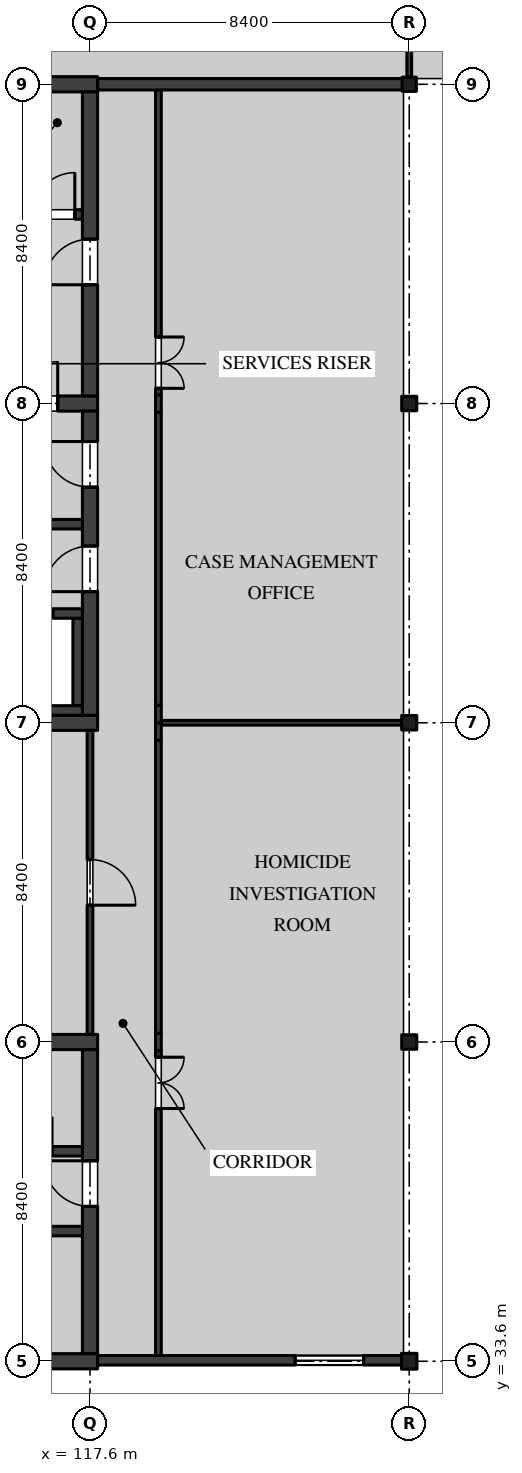
"""IFC4 building model, lengths in metres.
Left out: names, types, materials, properties, quantities, classifications, styles, units other than length and angle.
Written with IfcOpenShell. Run it as: python <this file> out.ifc"""

import sys

from ifc_helpers import new_model, si_unit, direction, frame, frame_2d, origin, origin_2d, place, context, subcontext, project, spatial, rectangle, i_section, extrude, element, fill, save


model = new_model("IFC4")
c1 = context("Model", 3, precision=1e-05, world=origin(), true_north=direction((0.0, 1.0)))
c2 = subcontext(c1, "Body", "Model", "MODEL_VIEW")
j1 = project(units=[si_unit("LENGTHUNIT", "METRE"), si_unit("PLANEANGLEUNIT", "RADIAN")], contexts=[c1])
p1 = place(None, origin())
s1 = spatial("IfcSite", under=j1, at=p1, CompositionType="ELEMENT")
p2 = place(p1, origin())
s2 = spatial("IfcBuilding", under=s1, at=p2, CompositionType="ELEMENT")
p3 = place(p2, frame((0.0, 0.0, 14.4)))
s3 = spatial("IfcBuildingStorey", under=s2, at=p3, CompositionType="ELEMENT", Elevation=14.4)
p4 = place(p3, frame((126.0, 33.6, 0.0), z_axis=(0.0, 0.0, 1.0), x_axis=(1.0, 0.0, 0.0)))
e1 = element("IfcColumn", 1, at=p4, inside=s3, PredefinedType="COLUMN", context=c2, shape_type="SweptSolid", body=[
    extrude(i_section(OverallWidth=0.406, OverallDepth=0.417, WebThickness=0.03, FlangeThickness=0.048, FilletRadius=0.015, at=origin_2d()), origin(), (0.0, 0.0, 1.0), 4.37),
])
for number, where, z_axis, x_axis in (
    (2, (126.0, 42.0, 0.0), (0.0, 0.0, 1.0), (1.0, 0.0, 0.0)),
    (3, (126.0, 50.4, 0.0), (0.0, 0.0, 1.0), (1.0, 0.0, 0.0)),
    (4, (126.0, 58.8, 0.0), (0.0, 0.0, 1.0), (1.0, 0.0, 0.0)),
):
    element("IfcColumn", number, at=place(p3, frame(where, z_axis=z_axis, x_axis=x_axis)), inside=s3, PredefinedType="COLUMN", context=c2, shape_type="SweptSolid", body=[
        extrude(i_section(OverallWidth=0.396, OverallDepth=0.381, WebThickness=0.019, FlangeThickness=0.03, FilletRadius=0.015, at=origin_2d()), origin(), (0.0, 0.0, 1.0), 4.37),
    ])
p5 = place(p3, frame((126.0, 67.2, 0.0), z_axis=(0.0, 0.0, 1.0), x_axis=(1.0, 0.0, 0.0)))
e5 = element("IfcColumn", 5, at=p5, inside=s3, PredefinedType="COLUMN", context=c2, shape_type="SweptSolid", body=[
    extrude(i_section(OverallWidth=0.373, OverallDepth=0.373, WebThickness=0.016, FlangeThickness=0.026, FilletRadius=0.015, at=origin_2d()), origin(), (0.0, 0.0, 1.0), 4.37),
])
p6 = place(p3, frame((109.0, 50.4, 0.0), z_axis=(0.0, 0.0, 1.0), x_axis=(1.0, 0.0, 0.0)))
e6 = element("IfcWall", 6, at=p6, inside=s3, PredefinedType="SHEAR", context=c2, shape_type="SweptSolid", body=[
    extrude(rectangle(XDim=8.8, YDim=0.4, at=frame_2d((4.4, 0.0))), origin(), (0.0, 0.0, 1.0), 4.37),
])
p7 = place(p3, frame((109.0, 58.8, 0.0), z_axis=(0.0, 0.0, 1.0), x_axis=(1.0, 0.0, 0.0)))
e7 = element("IfcWall", 7, at=p7, inside=s3, PredefinedType="SHEAR", context=c2, shape_type="SweptSolid", body=[
    extrude(rectangle(XDim=8.8, YDim=0.4, at=frame_2d((4.4, 0.0))), origin(), (0.0, 0.0, 1.0), 4.37),
])
p8 = place(p7, frame((6.65, 0.0, 0.0)))
e8 = element("IfcOpeningElement", 8, at=p8, cuts=e7, PredefinedType="OPENING", context=c2, shape_type="SweptSolid", body=[
    extrude(rectangle(XDim=1.1, YDim=2.1, at=frame_2d((0.55, 1.05))), frame((0.0, 0.21, 0.0), z_axis=(0.0, -1.0, 0.0), x_axis=(1.0, 0.0, 0.0)), (0.0, 0.0, 1.0), 0.42),
])
p9 = place(p3, frame((117.6, 50.6, 0.0), z_axis=(0.0, 0.0, 1.0), x_axis=(0.0, 1.0, 0.0)))
e9 = element("IfcWall", 9, at=p9, inside=s3, PredefinedType="SHEAR", context=c2, shape_type="SweptSolid", body=[
    extrude(rectangle(XDim=8.0, YDim=0.4, at=frame_2d((4.0, 0.0))), origin(), (0.0, 0.0, 1.0), 4.37),
])
p10 = place(p9, frame((3.25, 0.0, 0.0)))
e10 = element("IfcOpeningElement", 10, at=p10, cuts=e9, PredefinedType="OPENING", context=c2, shape_type="SweptSolid", body=[
    extrude(rectangle(XDim=1.2, YDim=2.1, at=frame_2d((0.6, 1.05))), frame((0.0, 0.21, 0.0), z_axis=(0.0, -1.0, 0.0), x_axis=(1.0, 0.0, 0.0)), (0.0, 0.0, 1.0), 0.42),
])
p11 = place(p9, frame((6.0, 0.0, 0.0)))
e11 = element("IfcOpeningElement", 11, at=p11, cuts=e9, PredefinedType="OPENING", context=c2, shape_type="SweptSolid", body=[
    extrude(rectangle(XDim=1.2, YDim=2.1, at=frame_2d((0.6, 1.05))), frame((0.0, 0.21, 0.0), z_axis=(0.0, -1.0, 0.0), x_axis=(1.0, 0.0, 0.0)), (0.0, 0.0, 1.0), 0.42),
])
p12 = place(p3, frame((114.75, 55.625, 0.0), z_axis=(0.0, 0.0, 1.0), x_axis=(1.0, 0.0, 0.0)))
e12 = element("IfcWall", 12, at=p12, inside=s3, PredefinedType="SOLIDWALL", context=c2, shape_type="SweptSolid", body=[
    extrude(rectangle(XDim=2.65, YDim=0.25, at=frame_2d((1.325, 0.0))), origin(), (0.0, 0.0, 1.0), 4.37),
])
p13 = place(p3, frame((109.0, 67.2, 0.0), z_axis=(0.0, 0.0, 1.0), x_axis=(1.0, 0.0, 0.0)))
e13 = element("IfcWall", 13, at=p13, inside=s3, PredefinedType="SHEAR", context=c2, shape_type="SweptSolid", body=[
    extrude(rectangle(XDim=8.8, YDim=0.4, at=frame_2d((4.4, 0.0))), origin(), (0.0, 0.0, 1.0), 4.37),
])
p14 = place(p3, frame((117.6, 59.0, 0.0), z_axis=(0.0, 0.0, 1.0), x_axis=(0.0, 1.0, 0.0)))
e14 = element("IfcWall", 14, at=p14, inside=s3, PredefinedType="SHEAR", context=c2, shape_type="SweptSolid", body=[
    extrude(rectangle(XDim=8.0, YDim=0.4, at=frame_2d((4.0, 0.0))), origin(), (0.0, 0.0, 1.0), 4.37),
])
p15 = place(p14, frame((2.925, 0.0, 0.0)))
e15 = element("IfcOpeningElement", 15, at=p15, cuts=e14, PredefinedType="OPENING", context=c2, shape_type="SweptSolid", body=[
    extrude(rectangle(XDim=1.2, YDim=2.1, at=frame_2d((0.6, 1.05))), frame((0.0, 0.21, 0.0), z_axis=(0.0, -1.0, 0.0), x_axis=(1.0, 0.0, 0.0)), (0.0, 0.0, 1.0), 0.42),
])
p16 = place(p3, frame((117.4, 63.775, 0.0), z_axis=(0.0, 0.0, 1.0), x_axis=(-1.0, 0.0, 0.0)))
e16 = element("IfcWall", 16, at=p16, inside=s3, PredefinedType="SOLIDWALL", context=c2, shape_type="SweptSolid", body=[
    extrude(rectangle(XDim=8.0, YDim=0.25, at=frame_2d((4.0, 0.0))), origin(), (0.0, 0.0, 1.0), 4.37),
])
p17 = place(p16, frame((0.2, 0.0, 0.0)))
e17 = element("IfcOpeningElement", 17, at=p17, cuts=e16, PredefinedType="OPENING", context=c2, shape_type="SweptSolid", body=[
    extrude(rectangle(XDim=1.1, YDim=2.1, at=frame_2d((0.55, 1.05))), frame((0.0, 0.135, 0.0), z_axis=(0.0, -1.0, 0.0), x_axis=(1.0, 0.0, 0.0)), (0.0, 0.0, 1.0), 0.27),
])
for number, where, z_axis, x_axis in (
    (18, (109.0, 33.6, 0.0), (0.0, 0.0, 1.0), (1.0, 0.0, 0.0)),
    (19, (109.0, 42.0, 0.0), (0.0, 0.0, 1.0), (1.0, 0.0, 0.0)),
):
    element("IfcWall", number, at=place(p3, frame(where, z_axis=z_axis, x_axis=x_axis)), inside=s3, PredefinedType="SHEAR", context=c2, shape_type="SweptSolid", body=[
        extrude(rectangle(XDim=8.8, YDim=0.4, at=frame_2d((4.4, 0.0))), origin(), (0.0, 0.0, 1.0), 4.37),
    ])
p18 = place(p3, frame((117.6, 33.8, 0.0), z_axis=(0.0, 0.0, 1.0), x_axis=(0.0, 1.0, 0.0)))
e20 = element("IfcWall", 20, at=p18, inside=s3, PredefinedType="SHEAR", context=c2, shape_type="SweptSolid", body=[
    extrude(rectangle(XDim=8.0, YDim=0.4, at=frame_2d((4.0, 0.0))), origin(), (0.0, 0.0, 1.0), 4.37),
])
p19 = place(p18, frame((3.875, 0.0, 0.0)))
e21 = element("IfcOpeningElement", 21, at=p19, cuts=e20, PredefinedType="OPENING", context=c2, shape_type="SweptSolid", body=[
    extrude(rectangle(XDim=1.2, YDim=2.1, at=frame_2d((0.6, 1.05))), frame((0.0, 0.21, 0.0), z_axis=(0.0, -1.0, 0.0), x_axis=(1.0, 0.0, 0.0)), (0.0, 0.0, 1.0), 0.42),
])
p20 = place(p3, frame((109.4, 37.025, 0.0), z_axis=(0.0, 0.0, 1.0), x_axis=(1.0, 0.0, 0.0)))
e22 = element("IfcWall", 22, at=p20, inside=s3, PredefinedType="SOLIDWALL", context=c2, shape_type="SweptSolid", body=[
    extrude(rectangle(XDim=8.0, YDim=0.25, at=frame_2d((4.0, 0.0))), origin(), (0.0, 0.0, 1.0), 4.37),
])
p21 = place(p20, frame((0.2, 0.0, 0.0)))
e23 = element("IfcOpeningElement", 23, at=p21, cuts=e22, PredefinedType="OPENING", context=c2, shape_type="SweptSolid", body=[
    extrude(rectangle(XDim=1.1, YDim=2.1, at=frame_2d((0.55, 1.05))), frame((0.0, 0.135, 0.0), z_axis=(0.0, -1.0, 0.0), x_axis=(1.0, 0.0, 0.0)), (0.0, 0.0, 1.0), 0.27),
])
p22 = place(p3, frame((112.05, 39.125, 0.0), z_axis=(0.0, 0.0, 1.0), x_axis=(1.0, 0.0, 0.0)))
e24 = element("IfcWall", 24, at=p22, inside=s3, PredefinedType="SOLIDWALL", context=c2, shape_type="SweptSolid", body=[
    extrude(rectangle(XDim=5.35, YDim=0.25, at=frame_2d((2.675, 0.0))), origin(), (0.0, 0.0, 1.0), 4.37),
])
p23 = place(p22, frame((3.65, 0.0, 0.0)))
e25 = element("IfcOpeningElement", 25, at=p23, cuts=e24, PredefinedType="OPENING", context=c2, shape_type="SweptSolid", body=[
    extrude(rectangle(XDim=0.9, YDim=2.1, at=frame_2d((0.45, 1.05))), frame((0.0, 0.135, 0.0), z_axis=(0.0, -1.0, 0.0), x_axis=(1.0, 0.0, 0.0)), (0.0, 0.0, 1.0), 0.27),
])
p24 = place(p22, frame((0.9, 0.0, 0.0)))
e26 = element("IfcOpeningElement", 26, at=p24, cuts=e24, PredefinedType="OPENING", context=c2, shape_type="SweptSolid", body=[
    extrude(rectangle(XDim=0.8, YDim=2.1, at=frame_2d((0.4, 1.05))), frame((0.0, 0.135, 0.0), z_axis=(0.0, -1.0, 0.0), x_axis=(1.0, 0.0, 0.0)), (0.0, 0.0, 1.0), 0.27),
])
p25 = place(p3, frame((117.275, 50.85, 0.0), z_axis=(0.0, 0.0, 1.0), x_axis=(0.0, 1.0, 0.0)))
e27 = element("IfcWall", 27, at=p25, inside=s3, PredefinedType="SOLIDWALL", context=c2, shape_type="SweptSolid", body=[
    extrude(rectangle(XDim=2.3, YDim=0.25, at=frame_2d((1.15, 0.0))), origin(), (0.0, 0.0, 1.0), 4.37),
])
p26 = place(p3, frame((114.75, 53.275, 0.0), z_axis=(0.0, 0.0, 1.0), x_axis=(1.0, 0.0, 0.0)))
e28 = element("IfcWall", 28, at=p26, inside=s3, PredefinedType="SOLIDWALL", context=c2, shape_type="SweptSolid", body=[
    extrude(rectangle(XDim=2.65, YDim=0.25, at=frame_2d((1.325, 0.0))), origin(), (0.0, 0.0, 1.0), 4.37),
])
p27 = place(p26, frame((0.775, 0.0, 0.0)))
e29 = element("IfcOpeningElement", 29, at=p27, cuts=e28, PredefinedType="OPENING", context=c2, shape_type="SweptSolid", body=[
    extrude(rectangle(XDim=1.1, YDim=2.1, at=frame_2d((0.55, 1.05))), frame((0.0, 0.135, 0.0), z_axis=(0.0, -1.0, 0.0), x_axis=(1.0, 0.0, 0.0)), (0.0, 0.0, 1.0), 0.27),
])
p28 = place(p3, frame((114.75, 50.725, 0.0), z_axis=(0.0, 0.0, 1.0), x_axis=(1.0, 0.0, 0.0)))
e30 = element("IfcWall", 30, at=p28, inside=s3, PredefinedType="SOLIDWALL", context=c2, shape_type="SweptSolid", body=[
    extrude(rectangle(XDim=2.65, YDim=0.25, at=frame_2d((1.325, 0.0))), origin(), (0.0, 0.0, 1.0), 4.37),
])
p29 = place(p3, frame((119.4, 33.75, 0.0), z_axis=(0.0, 0.0, 1.0), x_axis=(0.0, 1.0, 0.0)))
e31 = element("IfcWall", 31, at=p29, inside=s3, PredefinedType="PARTITIONING", context=c2, shape_type="SweptSolid", body=[
    extrude(rectangle(XDim=8.02, YDim=0.15, at=frame_2d((4.01, 0.0))), origin(), (0.0, 0.0, 1.0), 4.37),
])
p30 = place(p29, frame((6.5, 0.0, 0.0)))
e32 = element("IfcOpeningElement", 32, at=p30, cuts=e31, PredefinedType="OPENING", context=c2, shape_type="SweptSolid", body=[
    extrude(rectangle(XDim=1.35, YDim=2.1, at=frame_2d((0.675, 1.05))), frame((0.0, 0.085, 0.0), z_axis=(0.0, -1.0, 0.0), x_axis=(1.0, 0.0, 0.0)), (0.0, 0.0, 1.0), 0.17),
])
p31 = place(p3, frame((119.4, 41.77, 0.0), z_axis=(0.0, 0.0, 1.0), x_axis=(0.0, 1.0, 0.0)))
e33 = element("IfcWall", 33, at=p31, inside=s3, PredefinedType="PARTITIONING", context=c2, shape_type="SweptSolid", body=[
    extrude(rectangle(XDim=0.46, YDim=0.15, at=frame_2d((0.23, 0.0))), origin(), (0.0, 0.0, 1.0), 3.746),
])
p32 = place(p3, frame((119.4, 42.23, 0.0), z_axis=(0.0, 0.0, 1.0), x_axis=(0.0, 1.0, 0.0)))
e34 = element("IfcWall", 34, at=p32, inside=s3, PredefinedType="PARTITIONING", context=c2, shape_type="SweptSolid", body=[
    extrude(rectangle(XDim=7.71, YDim=0.15, at=frame_2d((3.855, 0.0))), origin(), (0.0, 0.0, 1.0), 4.37),
])
p33 = place(p3, frame((119.4, 49.94, 0.0), z_axis=(0.0, 0.0, 1.0), x_axis=(0.0, 1.0, 0.0)))
e35 = element("IfcWall", 35, at=p33, inside=s3, PredefinedType="PARTITIONING", context=c2, shape_type="SweptSolid", body=[
    extrude(rectangle(XDim=0.46, YDim=0.15, at=frame_2d((0.23, 0.0))), origin(), (0.0, 0.0, 1.0), 3.746),
])
p34 = place(p3, frame((119.4, 50.4, 0.0), z_axis=(0.0, 0.0, 1.0), x_axis=(0.0, 1.0, 0.0)))
e36 = element("IfcWall", 36, at=p34, inside=s3, PredefinedType="PARTITIONING", context=c2, shape_type="SweptSolid", body=[
    extrude(rectangle(XDim=0.46, YDim=0.15, at=frame_2d((0.23, 0.0))), origin(), (0.0, 0.0, 1.0), 3.746),
])
p35 = place(p3, frame((119.4, 50.86, 0.0), z_axis=(0.0, 0.0, 1.0), x_axis=(0.0, 1.0, 0.0)))
e37 = element("IfcWall", 37, at=p35, inside=s3, PredefinedType="PARTITIONING", context=c2, shape_type="SweptSolid", body=[
    extrude(rectangle(XDim=7.71, YDim=0.15, at=frame_2d((3.855, 0.0))), origin(), (0.0, 0.0, 1.0), 4.37),
])
p36 = place(p3, frame((119.4, 58.57, 0.0), z_axis=(0.0, 0.0, 1.0), x_axis=(0.0, 1.0, 0.0)))
e38 = element("IfcWall", 38, at=p36, inside=s3, PredefinedType="PARTITIONING", context=c2, shape_type="SweptSolid", body=[
    extrude(rectangle(XDim=0.46, YDim=0.15, at=frame_2d((0.23, 0.0))), origin(), (0.0, 0.0, 1.0), 3.746),
])
p37 = place(p3, frame((119.4, 59.03, 0.0), z_axis=(0.0, 0.0, 1.0), x_axis=(0.0, 1.0, 0.0)))
e39 = element("IfcWall", 39, at=p37, inside=s3, PredefinedType="PARTITIONING", context=c2, shape_type="SweptSolid", body=[
    extrude(rectangle(XDim=8.02, YDim=0.15, at=frame_2d((4.01, 0.0))), origin(), (0.0, 0.0, 1.0), 4.37),
])
p38 = place(p37, frame((0.17, 0.0, 0.0)))
e40 = element("IfcOpeningElement", 40, at=p38, cuts=e39, PredefinedType="OPENING", context=c2, shape_type="SweptSolid", body=[
    extrude(rectangle(XDim=1.35, YDim=2.1, at=frame_2d((0.675, 1.05))), frame((0.0, 0.085, 0.0), z_axis=(0.0, -1.0, 0.0), x_axis=(1.0, 0.0, 0.0)), (0.0, 0.0, 1.0), 0.17),
])
p39 = place(p3, frame((117.6, 42.2, 0.0), z_axis=(0.0, 0.0, 1.0), x_axis=(0.0, 1.0, 0.0)))
e41 = element("IfcWall", 41, at=p39, inside=s3, PredefinedType="PARTITIONING", context=c2, shape_type="SweptSolid", body=[
    extrude(rectangle(XDim=8.0, YDim=0.15, at=frame_2d((4.0, 0.0))), origin(), (0.0, 0.0, 1.0), 3.746),
])
p40 = place(p39, frame((3.4, 0.0, 0.0)))
e42 = element("IfcOpeningElement", 42, at=p40, cuts=e41, PredefinedType="OPENING", context=c2, shape_type="SweptSolid", body=[
    extrude(rectangle(XDim=1.2, YDim=2.4, at=frame_2d((0.6, 1.2))), frame((0.0, 0.085, 0.0), z_axis=(0.0, -1.0, 0.0), x_axis=(1.0, 0.0, 0.0)), (0.0, 0.0, 1.0), 0.17),
])
p41 = place(p3, frame((119.475, 50.4, 0.0), z_axis=(0.0, 0.0, 1.0), x_axis=(1.0, 0.0, 0.0)))
e43 = element("IfcWall", 43, at=p41, inside=s3, PredefinedType="PARTITIONING", context=c2, shape_type="SweptSolid", body=[
    extrude(rectangle(XDim=6.327, YDim=0.125, at=frame_2d((3.164, 0.0))), origin(), (0.0, 0.0, 1.0), 3.746),
])
p42 = place(p3, frame((126.0, 67.386, 0.0), z_axis=(0.0, 0.0, 1.0), x_axis=(0.0, 1.0, 0.0)))
e44 = element("IfcWall", 44, at=p42, inside=s3, PredefinedType="PARTITIONING", context=c2, shape_type="SweptSolid", body=[
    extrude(rectangle(XDim=6.639, YDim=0.125, at=frame_2d((3.319, 0.0))), origin(), (0.0, 0.0, 1.0), 3.746),
])
p43 = place(p3, frame((117.8, 33.625, 0.0), z_axis=(0.0, 0.0, 1.0), x_axis=(1.0, 0.0, 0.0)))
e45 = element("IfcWall", 45, at=p43, inside=s3, PredefinedType="SOLIDWALL", context=c2, shape_type="SweptSolid", body=[
    extrude(rectangle(XDim=8.195, YDim=0.25, at=frame_2d((4.098, 0.0))), origin(), (0.0, 0.0, 1.0), 3.746),
])
p44 = place(p43, frame((5.2, 0.0, 0.9)))
e46 = element("IfcOpeningElement", 46, at=p44, cuts=e45, PredefinedType="OPENING", context=c2, shape_type="SweptSolid", body=[
    extrude(rectangle(XDim=1.8, YDim=2.1, at=frame_2d((0.9, 1.05))), frame((0.0, 0.135, 0.0), z_axis=(0.0, -1.0, 0.0), x_axis=(1.0, 0.0, 0.0)), (0.0, 0.0, 1.0), 0.27),
])
p45 = place(p3, frame((125.998, 67.2, 0.0), z_axis=(0.0, 0.0, 1.0), x_axis=(-1.0, 0.0, 0.0)))
e47 = element("IfcWall", 47, at=p45, inside=s3, PredefinedType="SOLIDWALL", context=c2, shape_type="SweptSolid", body=[
    extrude(rectangle(XDim=8.198, YDim=0.3, at=frame_2d((4.099, 0.0))), origin(), (0.0, 0.0, 1.0), 3.746),
])
p46 = place(p10, origin())
e48 = element("IfcDoor", 48, at=p46, inside=s3, OperationType="SINGLE_SWING_RIGHT", PredefinedType="DOOR", context=c2, shape_type="SweptSolid", body=[
    extrude(rectangle(XDim=1.2, YDim=2.1, at=frame_2d((0.6, 1.05))), frame((0.0, 0.035, 0.0), z_axis=(0.0, -1.0, 0.0), x_axis=(1.0, 0.0, 0.0)), (0.0, 0.0, 1.0), 0.07),
])
fill(e10, e48)
p47 = place(p11, origin())
e49 = element("IfcDoor", 49, at=p47, inside=s3, OperationType="SINGLE_SWING_LEFT", PredefinedType="DOOR", context=c2, shape_type="SweptSolid", body=[
    extrude(rectangle(XDim=1.2, YDim=2.1, at=frame_2d((0.6, 1.05))), frame((0.0, 0.035, 0.0), z_axis=(0.0, -1.0, 0.0), x_axis=(1.0, 0.0, 0.0)), (0.0, 0.0, 1.0), 0.07),
])
fill(e11, e49)
p48 = place(p8, origin())
e50 = element("IfcDoor", 50, at=p48, inside=s3, OperationType="SINGLE_SWING_LEFT", PredefinedType="DOOR", context=c2, shape_type="SweptSolid", body=[
    extrude(rectangle(XDim=1.1, YDim=2.1, at=frame_2d((0.55, 1.05))), frame((0.0, 0.035, 0.0), z_axis=(0.0, -1.0, 0.0), x_axis=(1.0, 0.0, 0.0)), (0.0, 0.0, 1.0), 0.07),
])
fill(e8, e50)
p49 = place(p15, origin())
e51 = element("IfcDoor", 51, at=p49, inside=s3, OperationType="SINGLE_SWING_RIGHT", PredefinedType="DOOR", context=c2, shape_type="SweptSolid", body=[
    extrude(rectangle(XDim=1.2, YDim=2.1, at=frame_2d((0.6, 1.05))), frame((0.0, 0.035, 0.0), z_axis=(0.0, -1.0, 0.0), x_axis=(1.0, 0.0, 0.0)), (0.0, 0.0, 1.0), 0.07),
])
fill(e15, e51)
p50 = place(p17, frame((1.1, 0.0, 0.0), z_axis=(0.0, 0.0, 1.0), x_axis=(-1.0, 0.0, 0.0)))
e52 = element("IfcDoor", 52, at=p50, inside=s3, OperationType="SINGLE_SWING_LEFT", PredefinedType="DOOR", context=c2, shape_type="SweptSolid", body=[
    extrude(rectangle(XDim=1.1, YDim=2.1, at=frame_2d((0.55, 1.05))), frame((0.0, 0.035, 0.0), z_axis=(0.0, -1.0, 0.0), x_axis=(1.0, 0.0, 0.0)), (0.0, 0.0, 1.0), 0.07),
])
fill(e17, e52)
p51 = place(p19, origin())
e53 = element("IfcDoor", 53, at=p51, inside=s3, OperationType="SINGLE_SWING_LEFT", PredefinedType="DOOR", context=c2, shape_type="SweptSolid", body=[
    extrude(rectangle(XDim=1.2, YDim=2.1, at=frame_2d((0.6, 1.05))), frame((0.0, 0.035, 0.0), z_axis=(0.0, -1.0, 0.0), x_axis=(1.0, 0.0, 0.0)), (0.0, 0.0, 1.0), 0.07),
])
fill(e21, e53)
p52 = place(p27, origin())
e54 = element("IfcDoor", 54, at=p52, inside=s3, OperationType="DOUBLE_DOOR_SLIDING", PredefinedType="DOOR", context=c2, shape_type="SweptSolid", body=[
    extrude(rectangle(XDim=1.1, YDim=2.1, at=frame_2d((0.55, 1.05))), frame((0.0, 0.04, 0.0), z_axis=(0.0, -1.0, 0.0), x_axis=(1.0, 0.0, 0.0)), (0.0, 0.0, 1.0), 0.08),
])
fill(e29, e54)
p53 = place(p30, frame((1.35, 0.0, 0.0), z_axis=(0.0, 0.0, 1.0), x_axis=(-1.0, 0.0, 0.0)))
e55 = element("IfcDoor", 55, at=p53, inside=s3, OperationType="DOUBLE_DOOR_SINGLE_SWING", PredefinedType="DOOR", context=c2, shape_type="SweptSolid", body=[
    extrude(rectangle(XDim=1.35, YDim=2.1, at=frame_2d((0.675, 1.05))), frame((0.0, 0.025, 0.0), z_axis=(0.0, -1.0, 0.0), x_axis=(1.0, 0.0, 0.0)), (0.0, 0.0, 1.0), 0.05),
])
fill(e32, e55)
p54 = place(p38, frame((1.35, 0.0, 0.0), z_axis=(0.0, 0.0, 1.0), x_axis=(-1.0, 0.0, 0.0)))
e56 = element("IfcDoor", 56, at=p54, inside=s3, OperationType="DOUBLE_DOOR_SINGLE_SWING", PredefinedType="DOOR", context=c2, shape_type="SweptSolid", body=[
    extrude(rectangle(XDim=1.35, YDim=2.1, at=frame_2d((0.675, 1.05))), frame((0.0, 0.025, 0.0), z_axis=(0.0, -1.0, 0.0), x_axis=(1.0, 0.0, 0.0)), (0.0, 0.0, 1.0), 0.05),
])
fill(e40, e56)
p55 = place(p40, frame((1.2, 0.0, 0.0), z_axis=(0.0, 0.0, 1.0), x_axis=(-1.0, 0.0, 0.0)))
e57 = element("IfcDoor", 57, at=p55, inside=s3, OperationType="SINGLE_SWING_LEFT", PredefinedType="DOOR", context=c2, shape_type="SweptSolid", body=[
    extrude(rectangle(XDim=1.2, YDim=2.4, at=frame_2d((0.6, 1.2))), frame((0.0, 0.025, 0.0), z_axis=(0.0, -1.0, 0.0), x_axis=(1.0, 0.0, 0.0)), (0.0, 0.0, 1.0), 0.05),
])
fill(e42, e57)
p56 = place(p44, origin())
e58 = element("IfcWindow", 58, at=p56, inside=s3, PartitioningType="SINGLE_PANEL", PredefinedType="WINDOW", context=c2, shape_type="SweptSolid", body=[
    extrude(rectangle(XDim=1.8, YDim=2.1, at=frame_2d((0.9, 1.05))), frame((0.0, 0.04, 0.0), z_axis=(0.0, -1.0, 0.0), x_axis=(1.0, 0.0, 0.0)), (0.0, 0.0, 1.0), 0.08),
])
fill(e46, e58)
save(model, sys.argv[1])
